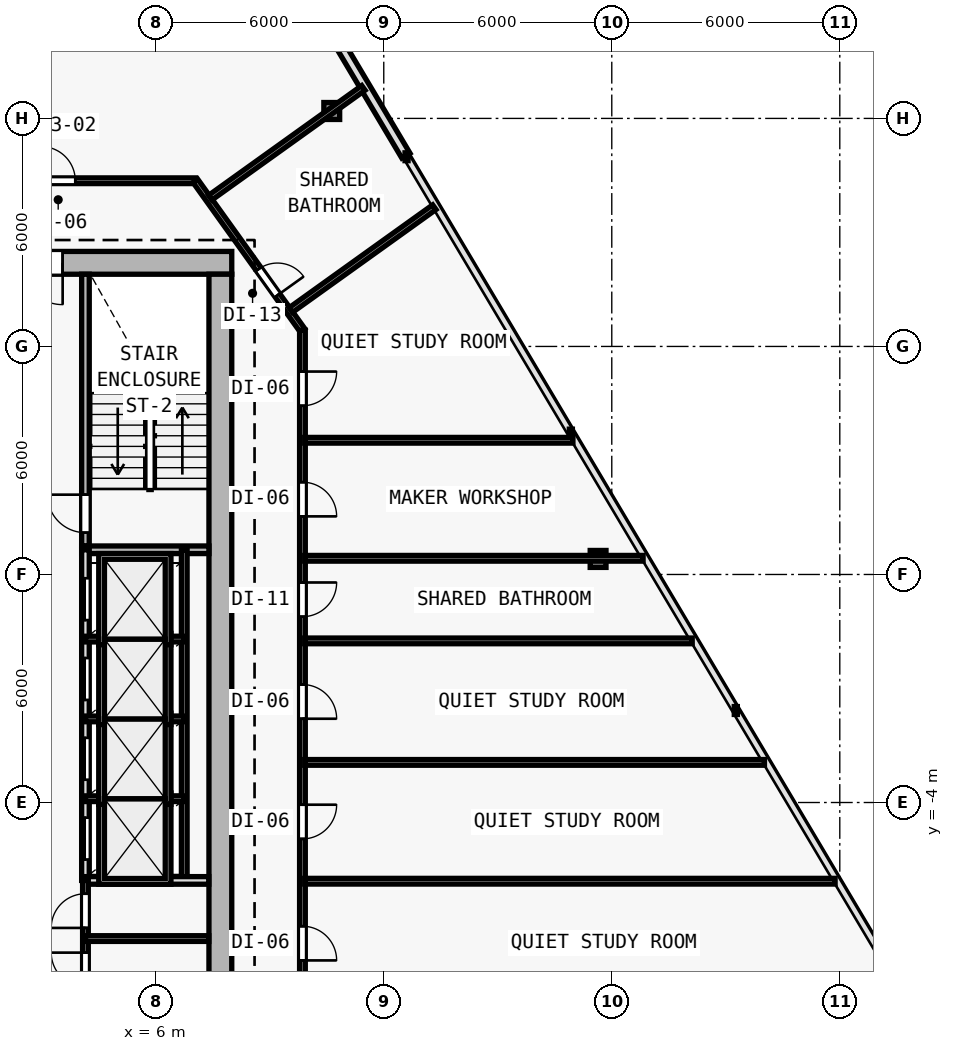
"""IFC4 building model, lengths in metres.
Left out: names, types, materials, properties, quantities, classifications, styles, units other than length and angle.
Written with IfcOpenShell. Run it as: python <this file> out.ifc"""

import sys

from ifc_helpers import new_model, si_unit, direction, frame, frame_2d, origin, origin_2d, place, context, subcontext, project, spatial, rectangle, i_section, extrude, element, fill, save


model = new_model("IFC4")
c1 = context("Model", 3, precision=1e-05, world=origin(), true_north=direction((0.0, 1.0)))
c2 = subcontext(c1, "Body", "Model", "MODEL_VIEW")
j1 = project(units=[si_unit("LENGTHUNIT", "METRE"), si_unit("PLANEANGLEUNIT", "RADIAN")], contexts=[c1])
p1 = place(None, origin())
s1 = spatial("IfcSite", under=j1, at=p1, CompositionType="ELEMENT")
p2 = place(p1, origin())
s2 = spatial("IfcBuilding", under=s1, at=p2, CompositionType="ELEMENT")
p3 = place(p2, frame((0.0, 0.0, 48.0)))
s3 = spatial("IfcBuildingStorey", under=s2, at=p3, CompositionType="ELEMENT", Elevation=48.0)
for number, where, z_axis, x_axis in (
    (1, (7.7, 10.2, 0.0), (0.0, 0.0, 1.0), (1.0, 0.0, 0.0)),
    (2, (7.7, 0.4, 0.0), (0.0, 0.0, 1.0), (1.0, 0.0, 0.0)),
):
    element("IfcColumn", number, at=place(p3, frame(where, z_axis=z_axis, x_axis=x_axis)), inside=s3, PredefinedType="COLUMN", context=c2, shape_type="SweptSolid", body=[
        extrude(i_section(OverallWidth=0.416, OverallDepth=0.446, WebThickness=0.025, FlangeThickness=0.04, FilletRadius=0.015, at=origin_2d()), origin(), (0.0, 0.0, 1.0), 3.6),
    ])
p4 = place(p3, frame((17.64, 2.409, 0.006), z_axis=(-0.018907326549, 0.00952167524, 0.999775900241), x_axis=(-0.449781931574, -0.893138406984, 0.0)))
e3 = element("IfcColumn", 3, at=p4, inside=s3, PredefinedType="COLUMN", context=c2, shape_type="SweptSolid", body=[
    extrude(i_section(OverallWidth=0.416, OverallDepth=0.446, WebThickness=0.025, FlangeThickness=0.04, FilletRadius=0.015, at=origin_2d()), origin(), (0.0, 0.0, 1.0), 3.59),
])
p5 = place(p3, frame((10.632, 14.195, 0.006), z_axis=(-0.011767855299, -0.002516824544, 0.999927588966), x_axis=(0.209143047003, -0.977885057607, 0.0)))
e4 = element("IfcColumn", 4, at=p5, inside=s3, PredefinedType="COLUMN", context=c2, shape_type="SweptSolid", body=[
    extrude(i_section(OverallWidth=0.416, OverallDepth=0.446, WebThickness=0.025, FlangeThickness=0.04, FilletRadius=0.015, at=origin_2d()), origin(), (0.0, 0.0, 1.0), 3.589),
])
p6 = place(p3, frame((6.483, 23.278, 0.0), z_axis=(0.0, 0.0, 1.0), x_axis=(0.511086421046, -0.859529330635, 0.0)))
e5 = element("IfcWall", 5, at=p6, inside=s3, PredefinedType="SOLIDWALL", context=c2, shape_type="SweptSolid", body=[
    extrude(rectangle(XDim=11.935, YDim=0.25, at=frame_2d((5.968, 0.0))), origin(), (0.0, 0.0, 1.0), 3.35),
])
p7 = place(p6, frame((5.368, 0.0, 0.62)))
e6 = element("IfcOpeningElement", 6, at=p7, cuts=e5, PredefinedType="OPENING", context=c2, shape_type="SweptSolid", body=[
    extrude(rectangle(XDim=1.2, YDim=1.8, at=frame_2d((0.6, 0.9))), frame((0.0, 0.135, 0.0), z_axis=(0.0, -1.0, 0.0), x_axis=(1.0, 0.0, 0.0)), (0.0, 0.0, 1.0), 0.27),
])
p8 = place(p3, frame((8.0, 10.2, 0.0), z_axis=(0.0, 0.0, 1.0), x_axis=(-1.0, 0.0, 0.0)))
e7 = element("IfcWall", 7, at=p8, inside=s3, PredefinedType="SHEAR", context=c2, shape_type="SweptSolid", body=[
    extrude(rectangle(XDim=16.0, YDim=0.6, at=frame_2d((8.0, 0.0))), origin(), (0.0, 0.0, 1.0), 3.35),
])
p9 = place(p8, frame((4.45, 0.0, 0.0)))
e8 = element("IfcOpeningElement", 8, at=p9, cuts=e7, PredefinedType="OPENING", context=c2, shape_type="SweptSolid", body=[
    extrude(rectangle(XDim=1.1, YDim=2.15, at=frame_2d((0.55, 1.075))), frame((0.0, 0.31, 0.0), z_axis=(0.0, -1.0, 0.0), x_axis=(1.0, 0.0, 0.0)), (0.0, 0.0, 1.0), 0.62),
])
p10 = place(p3, frame((7.7, 9.9, 0.0), z_axis=(0.0, 0.0, 1.0), x_axis=(0.0, -1.0, 0.0)))
e9 = element("IfcWall", 9, at=p10, inside=s3, PredefinedType="SHEAR", context=c2, shape_type="SweptSolid", body=[
    extrude(rectangle(XDim=19.0, YDim=0.6, at=frame_2d((9.5, 0.0))), origin(), (0.0, 0.0, 1.0), 3.35),
])
p11 = place(p3, frame((4.15, 2.75, 0.0), z_axis=(0.0, 0.0, 1.0), x_axis=(0.0, 1.0, 0.0)))
e10 = element("IfcWall", 10, at=p11, inside=s3, PredefinedType="SOLIDWALL", context=c2, shape_type="SweptSolid", body=[
    extrude(rectangle(XDim=7.15, YDim=0.2, at=frame_2d((3.575, 0.0))), origin(), (0.0, 0.0, 1.0), 3.35),
])
p12 = place(p11, frame((0.35, 0.0, 0.0)))
e11 = element("IfcOpeningElement", 11, at=p12, cuts=e10, PredefinedType="OPENING", context=c2, shape_type="SweptSolid", body=[
    extrude(rectangle(XDim=1.0, YDim=2.15, at=frame_2d((0.5, 1.075))), frame((0.0, 0.11, 0.0), z_axis=(0.0, -1.0, 0.0), x_axis=(1.0, 0.0, 0.0)), (0.0, 0.0, 1.0), 0.22),
])
p13 = place(p3, frame((4.05, 2.65, 0.0), z_axis=(0.0, 0.0, 1.0), x_axis=(1.0, 0.0, 0.0)))
e12 = element("IfcWall", 12, at=p13, inside=s3, PredefinedType="SOLIDWALL", context=c2, shape_type="SweptSolid", body=[
    extrude(rectangle(XDim=3.35, YDim=0.2, at=frame_2d((1.675, 0.0))), origin(), (0.0, 0.0, 1.0), 3.35),
])
p14 = place(p3, frame((4.15, -6.05, 0.0), z_axis=(0.0, 0.0, 1.0), x_axis=(0.0, 1.0, 0.0)))
e13 = element("IfcWall", 13, at=p14, inside=s3, PredefinedType="SOLIDWALL", context=c2, shape_type="SweptSolid", body=[
    extrude(rectangle(XDim=8.7, YDim=0.2, at=frame_2d((4.35, 0.0))), origin(), (0.0, 0.0, 1.0), 3.35),
])
p15 = place(p14, frame((0.55, 0.0, 0.0)))
e14 = element("IfcOpeningElement", 14, at=p15, cuts=e13, PredefinedType="OPENING", context=c2, shape_type="SweptSolid", body=[
    extrude(rectangle(XDim=1.1, YDim=2.15, at=frame_2d((0.55, 1.075))), frame((0.0, 0.11, 0.0), z_axis=(0.0, -1.0, 0.0), x_axis=(1.0, 0.0, 0.0)), (0.0, 0.0, 1.0), 0.22),
])
p16 = place(p14, frame((2.65, 0.0, 0.0)))
e15 = element("IfcOpeningElement", 15, at=p16, cuts=e13, PredefinedType="OPENING", context=c2, shape_type="SweptSolid", body=[
    extrude(rectangle(XDim=1.1, YDim=2.15, at=frame_2d((0.55, 1.075))), frame((0.0, 0.11, 0.0), z_axis=(0.0, -1.0, 0.0), x_axis=(1.0, 0.0, 0.0)), (0.0, 0.0, 1.0), 0.22),
])
p17 = place(p14, frame((4.75, 0.0, 0.0)))
e16 = element("IfcOpeningElement", 16, at=p17, cuts=e13, PredefinedType="OPENING", context=c2, shape_type="SweptSolid", body=[
    extrude(rectangle(XDim=1.1, YDim=2.15, at=frame_2d((0.55, 1.075))), frame((0.0, 0.11, 0.0), z_axis=(0.0, -1.0, 0.0), x_axis=(1.0, 0.0, 0.0)), (0.0, 0.0, 1.0), 0.22),
])
p18 = place(p14, frame((6.85, 0.0, 0.0)))
e17 = element("IfcOpeningElement", 17, at=p18, cuts=e13, PredefinedType="OPENING", context=c2, shape_type="SweptSolid", body=[
    extrude(rectangle(XDim=1.1, YDim=2.15, at=frame_2d((0.55, 1.075))), frame((0.0, 0.11, 0.0), z_axis=(0.0, -1.0, 0.0), x_axis=(1.0, 0.0, 0.0)), (0.0, 0.0, 1.0), 0.22),
])
p19 = place(p3, frame((6.75, -6.05, 0.0), z_axis=(0.0, 0.0, 1.0), x_axis=(0.0, 1.0, 0.0)))
e18 = element("IfcWall", 18, at=p19, inside=s3, PredefinedType="PARTITIONING", context=c2, shape_type="SweptSolid", body=[
    extrude(rectangle(XDim=8.7, YDim=0.15, at=frame_2d((4.35, 0.0))), origin(), (0.0, 0.0, 1.0), 3.35),
])
for number, where, z_axis, x_axis in (
    (19, (4.15, -3.9, 0.0), (0.0, 0.0, 1.0), (1.0, 0.0, 0.0)),
    (20, (4.15, -1.8, 0.0), (0.0, 0.0, 1.0), (1.0, 0.0, 0.0)),
    (21, (4.15, 0.3, 0.0), (0.0, 0.0, 1.0), (1.0, 0.0, 0.0)),
):
    element("IfcWall", number, at=place(p3, frame(where, z_axis=z_axis, x_axis=x_axis)), inside=s3, PredefinedType="PARTITIONING", context=c2, shape_type="SweptSolid", body=[
        extrude(rectangle(XDim=2.6, YDim=0.15, at=frame_2d((1.3, 0.0))), origin(), (0.0, 0.0, 1.0), 3.35),
    ])
p20 = place(p3, frame((4.15, -6.05, 0.0), z_axis=(0.0, 0.0, 1.0), x_axis=(1.0, 0.0, 0.0)))
e22 = element("IfcWall", 22, at=p20, inside=s3, PredefinedType="SOLIDWALL", context=c2, shape_type="SweptSolid", body=[
    extrude(rectangle(XDim=3.245, YDim=0.2, at=frame_2d((1.623, 0.0))), origin(), (0.0, 0.0, 1.0), 3.35),
])
p21 = place(p3, frame((4.15, -9.095, 0.0), z_axis=(0.0, 0.0, 1.0), x_axis=(0.0, 1.0, 0.0)))
e23 = element("IfcWall", 23, at=p21, inside=s3, PredefinedType="PARTITIONING", context=c2, shape_type="SweptSolid", body=[
    extrude(rectangle(XDim=3.045, YDim=0.15, at=frame_2d((1.522, 0.0))), origin(), (0.0, 0.0, 1.0), 3.35),
])
p22 = place(p21, frame((0.245, 0.0, 0.0)))
e24 = element("IfcOpeningElement", 24, at=p22, cuts=e23, PredefinedType="OPENING", context=c2, shape_type="SweptSolid", body=[
    extrude(rectangle(XDim=0.9, YDim=2.1, at=frame_2d((0.45, 1.05))), frame((0.0, 0.085, 0.0), z_axis=(0.0, -1.0, 0.0), x_axis=(1.0, 0.0, 0.0)), (0.0, 0.0, 1.0), 0.17),
])
p23 = place(p21, frame((1.795, 0.0, 0.0)))
e25 = element("IfcOpeningElement", 25, at=p23, cuts=e23, PredefinedType="OPENING", context=c2, shape_type="SweptSolid", body=[
    extrude(rectangle(XDim=0.9, YDim=2.1, at=frame_2d((0.45, 1.05))), frame((0.0, 0.085, 0.0), z_axis=(0.0, -1.0, 0.0), x_axis=(1.0, 0.0, 0.0)), (0.0, 0.0, 1.0), 0.17),
])
p24 = place(p3, frame((4.15, -7.58, 0.0), z_axis=(0.0, 0.0, 1.0), x_axis=(1.0, 0.0, 0.0)))
e26 = element("IfcWall", 26, at=p24, inside=s3, PredefinedType="PARTITIONING", context=c2, shape_type="SweptSolid", body=[
    extrude(rectangle(XDim=3.245, YDim=0.15, at=frame_2d((1.623, 0.0))), origin(), (0.0, 0.0, 1.0), 3.35),
])
p25 = place(p3, frame((-7.041, 12.36, 0.0), z_axis=(0.0, 0.0, 1.0), x_axis=(1.0, 0.0, 0.0)))
e27 = element("IfcWall", 27, at=p25, inside=s3, PredefinedType="PARTITIONING", context=c2, shape_type="SweptSolid", body=[
    extrude(rectangle(XDim=14.082, YDim=0.15, at=frame_2d((7.041, 0.0))), origin(), (0.0, 0.0, 1.0), 3.35),
])
p26 = place(p25, frame((10.024, 0.0, 0.0)))
e28 = element("IfcOpeningElement", 28, at=p26, cuts=e27, PredefinedType="OPENING", context=c2, shape_type="SweptSolid", body=[
    extrude(rectangle(XDim=0.9, YDim=2.1, at=frame_2d((0.45, 1.05))), frame((0.0, 0.085, 0.0), z_axis=(0.0, -1.0, 0.0), x_axis=(1.0, 0.0, 0.0)), (0.0, 0.0, 1.0), 0.17),
])
p27 = place(p25, frame((3.161, 0.0, 0.0)))
e29 = element("IfcOpeningElement", 29, at=p27, cuts=e27, PredefinedType="OPENING", context=c2, shape_type="SweptSolid", body=[
    extrude(rectangle(XDim=0.9, YDim=2.1, at=frame_2d((0.45, 1.05))), frame((0.0, 0.085, 0.0), z_axis=(0.0, -1.0, 0.0), x_axis=(1.0, 0.0, 0.0)), (0.0, 0.0, 1.0), 0.17),
])
p28 = place(p3, frame((7.041, 12.36, 0.0), z_axis=(0.0, 0.0, 1.0), x_axis=(0.582449511476, -0.812866881218, 0.0)))
e30 = element("IfcWall", 30, at=p28, inside=s3, PredefinedType="PARTITIONING", context=c2, shape_type="SweptSolid", body=[
    extrude(rectangle(XDim=4.84, YDim=0.15, at=frame_2d((2.42, 0.0))), origin(), (0.0, 0.0, 1.0), 2.725),
])
p29 = place(p28, frame((2.86, 0.0, 0.0)))
e31 = element("IfcOpeningElement", 31, at=p29, cuts=e30, PredefinedType="OPENING", context=c2, shape_type="SweptSolid", body=[
    extrude(rectangle(XDim=0.85, YDim=2.1, at=frame_2d((0.425, 1.05))), frame((0.0, 0.085, 0.0), z_axis=(0.0, -1.0, 0.0), x_axis=(1.0, 0.0, 0.0)), (0.0, 0.0, 1.0), 0.17),
])
p30 = place(p3, frame((9.86, 8.426, 0.0), z_axis=(0.0, 0.0, 1.0), x_axis=(0.0, -1.0, 0.0)))
e32 = element("IfcWall", 32, at=p30, inside=s3, PredefinedType="PARTITIONING", context=c2, shape_type="SweptSolid", body=[
    extrude(rectangle(XDim=19.986, YDim=0.15, at=frame_2d((9.993, 0.0))), origin(), (0.0, 0.0, 1.0), 2.609),
])
p31 = place(p30, frame((15.681, 0.0, 0.0)))
e33 = element("IfcOpeningElement", 33, at=p31, cuts=e32, PredefinedType="OPENING", context=c2, shape_type="SweptSolid", body=[
    extrude(rectangle(XDim=0.9, YDim=2.1, at=frame_2d((0.45, 1.05))), frame((0.0, 0.085, 0.0), z_axis=(0.0, -1.0, 0.0), x_axis=(1.0, 0.0, 0.0)), (0.0, 0.0, 1.0), 0.17),
])
p32 = place(p30, frame((12.483, 0.0, 0.0)))
e34 = element("IfcOpeningElement", 34, at=p32, cuts=e32, PredefinedType="OPENING", context=c2, shape_type="SweptSolid", body=[
    extrude(rectangle(XDim=0.9, YDim=2.1, at=frame_2d((0.45, 1.05))), frame((0.0, 0.085, 0.0), z_axis=(0.0, -1.0, 0.0), x_axis=(1.0, 0.0, 0.0)), (0.0, 0.0, 1.0), 0.17),
])
p33 = place(p30, frame((9.322, 0.0, 0.0)))
e35 = element("IfcOpeningElement", 35, at=p33, cuts=e32, PredefinedType="OPENING", context=c2, shape_type="SweptSolid", body=[
    extrude(rectangle(XDim=0.9, YDim=2.1, at=frame_2d((0.45, 1.05))), frame((0.0, 0.085, 0.0), z_axis=(0.0, -1.0, 0.0), x_axis=(1.0, 0.0, 0.0)), (0.0, 0.0, 1.0), 0.17),
])
p34 = place(p30, frame((6.636, 0.0, 0.0)))
e36 = element("IfcOpeningElement", 36, at=p34, cuts=e32, PredefinedType="OPENING", context=c2, shape_type="SweptSolid", body=[
    extrude(rectangle(XDim=0.9, YDim=2.1, at=frame_2d((0.45, 1.05))), frame((0.0, 0.085, 0.0), z_axis=(0.0, -1.0, 0.0), x_axis=(1.0, 0.0, 0.0)), (0.0, 0.0, 1.0), 0.17),
])
p35 = place(p30, frame((3.997, 0.0, 0.0)))
e37 = element("IfcOpeningElement", 37, at=p35, cuts=e32, PredefinedType="OPENING", context=c2, shape_type="SweptSolid", body=[
    extrude(rectangle(XDim=0.9, YDim=2.1, at=frame_2d((0.45, 1.05))), frame((0.0, 0.085, 0.0), z_axis=(0.0, -1.0, 0.0), x_axis=(1.0, 0.0, 0.0)), (0.0, 0.0, 1.0), 0.17),
])
p36 = place(p30, frame((1.086, 0.0, 0.0)))
e38 = element("IfcOpeningElement", 38, at=p36, cuts=e32, PredefinedType="OPENING", context=c2, shape_type="SweptSolid", body=[
    extrude(rectangle(XDim=0.9, YDim=2.1, at=frame_2d((0.45, 1.05))), frame((0.0, 0.085, 0.0), z_axis=(0.0, -1.0, 0.0), x_axis=(1.0, 0.0, 0.0)), (0.0, 0.0, 1.0), 0.17),
])
p37 = place(p3, frame((9.92, 2.426, 0.0), z_axis=(0.0, 0.0, 1.0), x_axis=(1.0, 0.0, 0.0)))
e39 = element("IfcWall", 39, at=p37, inside=s3, PredefinedType="PARTITIONING", context=c2, shape_type="SweptSolid", body=[
    extrude(rectangle(XDim=8.904, YDim=0.15, at=frame_2d((4.452, 0.0))), origin(), (0.0, 0.0, 1.0), 2.735),
])
p38 = place(p3, frame((7.434, 11.915, 0.0), z_axis=(0.0, 0.0, 1.0), x_axis=(0.812890943838, 0.582415928205, 0.0)))
e40 = element("IfcWall", 40, at=p38, inside=s3, PredefinedType="PARTITIONING", context=c2, shape_type="SweptSolid", body=[
    extrude(rectangle(XDim=4.958, YDim=0.15, at=frame_2d((2.479, 0.0))), origin(), (0.0, 0.0, 1.0), 2.725),
])
p39 = place(p3, frame((9.92, -2.945, 0.0), z_axis=(0.0, 0.0, 1.0), x_axis=(1.0, 0.0, 0.0)))
e41 = element("IfcWall", 41, at=p39, inside=s3, PredefinedType="PARTITIONING", context=c2, shape_type="SweptSolid", body=[
    extrude(rectangle(XDim=12.098, YDim=0.15, at=frame_2d((6.049, 0.0))), origin(), (0.0, 0.0, 1.0), 2.725),
])
p40 = place(p3, frame((9.553, 8.957, 0.0), z_axis=(0.0, 0.0, 1.0), x_axis=(0.812884279405, 0.58242522979, 0.0)))
e42 = element("IfcWall", 42, at=p40, inside=s3, PredefinedType="PARTITIONING", context=c2, shape_type="SweptSolid", body=[
    extrude(rectangle(XDim=4.647, YDim=0.15, at=frame_2d((2.324, 0.0))), origin(), (0.0, 0.0, 1.0), 2.735),
])
p41 = place(p3, frame((9.92, -6.071, 0.0), z_axis=(0.0, 0.0, 1.0), x_axis=(1.0, 0.0, 0.0)))
e43 = element("IfcWall", 43, at=p41, inside=s3, PredefinedType="PARTITIONING", context=c2, shape_type="SweptSolid", body=[
    extrude(rectangle(XDim=13.957, YDim=0.15, at=frame_2d((6.978, 0.0))), origin(), (0.0, 0.0, 1.0), 2.725),
])
p42 = place(p3, frame((9.92, 0.253, 0.0), z_axis=(0.0, 0.0, 1.0), x_axis=(1.0, 0.0, 0.0)))
e44 = element("IfcWall", 44, at=p42, inside=s3, PredefinedType="PARTITIONING", context=c2, shape_type="SweptSolid", body=[
    extrude(rectangle(XDim=10.197, YDim=0.15, at=frame_2d((5.098, 0.0))), origin(), (0.0, 0.0, 1.0), 2.725),
])
p43 = place(p3, frame((9.92, 5.531, 0.0), z_axis=(0.0, 0.0, 1.0), x_axis=(1.0, 0.0, 0.0)))
e45 = element("IfcWall", 45, at=p43, inside=s3, PredefinedType="PARTITIONING", context=c2, shape_type="SweptSolid", body=[
    extrude(rectangle(XDim=7.058, YDim=0.15, at=frame_2d((3.529, 0.0))), origin(), (0.0, 0.0, 1.0), 2.735),
])
p44 = place(p9, origin())
e46 = element("IfcDoor", 46, at=p44, inside=s3, OperationType="SINGLE_SWING_LEFT", PredefinedType="DOOR", context=c2, shape_type="SweptSolid", body=[
    extrude(rectangle(XDim=1.1, YDim=2.15, at=frame_2d((0.55, 1.075))), frame((0.0, 0.025, 0.0), z_axis=(0.0, -1.0, 0.0), x_axis=(1.0, 0.0, 0.0)), (0.0, 0.0, 1.0), 0.05),
])
fill(e8, e46)
p45 = place(p12, origin())
e47 = element("IfcDoor", 47, at=p45, inside=s3, OperationType="SINGLE_SWING_RIGHT", PredefinedType="DOOR", context=c2, shape_type="SweptSolid", body=[
    extrude(rectangle(XDim=1.0, YDim=2.15, at=frame_2d((0.5, 1.075))), frame((0.0, 0.025, 0.0), z_axis=(0.0, -1.0, 0.0), x_axis=(1.0, 0.0, 0.0)), (0.0, 0.0, 1.0), 0.05),
])
fill(e11, e47)
p46 = place(p15, origin())
e48 = element("IfcDoor", 48, at=p46, inside=s3, OperationType="DOUBLE_DOOR_SLIDING", PredefinedType="DOOR", context=c2, shape_type="SweptSolid", body=[
    extrude(rectangle(XDim=1.1, YDim=2.15, at=frame_2d((0.55, 1.075))), frame((0.0, 0.025, 0.0), z_axis=(0.0, -1.0, 0.0), x_axis=(1.0, 0.0, 0.0)), (0.0, 0.0, 1.0), 0.05),
])
fill(e14, e48)
p47 = place(p16, origin())
e49 = element("IfcDoor", 49, at=p47, inside=s3, OperationType="DOUBLE_DOOR_SLIDING", PredefinedType="DOOR", context=c2, shape_type="SweptSolid", body=[
    extrude(rectangle(XDim=1.1, YDim=2.15, at=frame_2d((0.55, 1.075))), frame((0.0, 0.025, 0.0), z_axis=(0.0, -1.0, 0.0), x_axis=(1.0, 0.0, 0.0)), (0.0, 0.0, 1.0), 0.05),
])
fill(e15, e49)
p48 = place(p17, origin())
e50 = element("IfcDoor", 50, at=p48, inside=s3, OperationType="DOUBLE_DOOR_SLIDING", PredefinedType="DOOR", context=c2, shape_type="SweptSolid", body=[
    extrude(rectangle(XDim=1.1, YDim=2.15, at=frame_2d((0.55, 1.075))), frame((0.0, 0.025, 0.0), z_axis=(0.0, -1.0, 0.0), x_axis=(1.0, 0.0, 0.0)), (0.0, 0.0, 1.0), 0.05),
])
fill(e16, e50)
p49 = place(p18, origin())
e51 = element("IfcDoor", 51, at=p49, inside=s3, OperationType="DOUBLE_DOOR_SLIDING", PredefinedType="DOOR", context=c2, shape_type="SweptSolid", body=[
    extrude(rectangle(XDim=1.1, YDim=2.15, at=frame_2d((0.55, 1.075))), frame((0.0, 0.025, 0.0), z_axis=(0.0, -1.0, 0.0), x_axis=(1.0, 0.0, 0.0)), (0.0, 0.0, 1.0), 0.05),
])
fill(e17, e51)
p50 = place(p22, origin())
e52 = element("IfcDoor", 52, at=p50, inside=s3, OperationType="SINGLE_SWING_RIGHT", PredefinedType="DOOR", context=c2, shape_type="SweptSolid", body=[
    extrude(rectangle(XDim=0.9, YDim=2.1, at=frame_2d((0.45, 1.05))), frame((0.0, 0.025, 0.0), z_axis=(0.0, -1.0, 0.0), x_axis=(1.0, 0.0, 0.0)), (0.0, 0.0, 1.0), 0.05),
])
fill(e24, e52)
p51 = place(p23, origin())
e53 = element("IfcDoor", 53, at=p51, inside=s3, OperationType="SINGLE_SWING_LEFT", PredefinedType="DOOR", context=c2, shape_type="SweptSolid", body=[
    extrude(rectangle(XDim=0.9, YDim=2.1, at=frame_2d((0.45, 1.05))), frame((0.0, 0.025, 0.0), z_axis=(0.0, -1.0, 0.0), x_axis=(1.0, 0.0, 0.0)), (0.0, 0.0, 1.0), 0.05),
])
fill(e25, e53)
p52 = place(p31, origin())
e54 = element("IfcDoor", 54, at=p52, inside=s3, OperationType="SINGLE_SWING_RIGHT", PredefinedType="DOOR", context=c2, shape_type="SweptSolid", body=[
    extrude(rectangle(XDim=0.9, YDim=2.1, at=frame_2d((0.45, 1.05))), frame((0.0, 0.025, 0.0), z_axis=(0.0, -1.0, 0.0), x_axis=(1.0, 0.0, 0.0)), (0.0, 0.0, 1.0), 0.05),
])
fill(e33, e54)
p53 = place(p32, origin())
e55 = element("IfcDoor", 55, at=p53, inside=s3, OperationType="SINGLE_SWING_LEFT", PredefinedType="DOOR", context=c2, shape_type="SweptSolid", body=[
    extrude(rectangle(XDim=0.9, YDim=2.1, at=frame_2d((0.45, 1.05))), frame((0.0, 0.025, 0.0), z_axis=(0.0, -1.0, 0.0), x_axis=(1.0, 0.0, 0.0)), (0.0, 0.0, 1.0), 0.05),
])
fill(e34, e55)
p54 = place(p33, origin())
e56 = element("IfcDoor", 56, at=p54, inside=s3, OperationType="SINGLE_SWING_RIGHT", PredefinedType="DOOR", context=c2, shape_type="SweptSolid", body=[
    extrude(rectangle(XDim=0.9, YDim=2.1, at=frame_2d((0.45, 1.05))), frame((0.0, 0.025, 0.0), z_axis=(0.0, -1.0, 0.0), x_axis=(1.0, 0.0, 0.0)), (0.0, 0.0, 1.0), 0.05),
])
fill(e35, e56)
p55 = place(p34, origin())
e57 = element("IfcDoor", 57, at=p55, inside=s3, OperationType="SINGLE_SWING_LEFT", PredefinedType="DOOR", context=c2, shape_type="SweptSolid", body=[
    extrude(rectangle(XDim=0.9, YDim=2.1, at=frame_2d((0.45, 1.05))), frame((0.0, 0.025, 0.0), z_axis=(0.0, -1.0, 0.0), x_axis=(1.0, 0.0, 0.0)), (0.0, 0.0, 1.0), 0.05),
])
fill(e36, e57)
p56 = place(p35, origin())
e58 = element("IfcDoor", 58, at=p56, inside=s3, OperationType="SINGLE_SWING_RIGHT", PredefinedType="DOOR", context=c2, shape_type="SweptSolid", body=[
    extrude(rectangle(XDim=0.9, YDim=2.1, at=frame_2d((0.45, 1.05))), frame((0.0, 0.025, 0.0), z_axis=(0.0, -1.0, 0.0), x_axis=(1.0, 0.0, 0.0)), (0.0, 0.0, 1.0), 0.05),
])
fill(e37, e58)
p57 = place(p36, origin())
e59 = element("IfcDoor", 59, at=p57, inside=s3, OperationType="SINGLE_SWING_LEFT", PredefinedType="DOOR", context=c2, shape_type="SweptSolid", body=[
    extrude(rectangle(XDim=0.9, YDim=2.1, at=frame_2d((0.45, 1.05))), frame((0.0, 0.025, 0.0), z_axis=(0.0, -1.0, 0.0), x_axis=(1.0, 0.0, 0.0)), (0.0, 0.0, 1.0), 0.05),
])
fill(e38, e59)
p58 = place(p29, origin())
e60 = element("IfcDoor", 60, at=p58, inside=s3, OperationType="SINGLE_SWING_RIGHT", PredefinedType="DOOR", context=c2, shape_type="SweptSolid", body=[
    extrude(rectangle(XDim=0.85, YDim=2.1, at=frame_2d((0.425, 1.05))), frame((0.0, 0.025, 0.0), z_axis=(0.0, -1.0, 0.0), x_axis=(1.0, 0.0, 0.0)), (0.0, 0.0, 1.0), 0.05),
])
fill(e31, e60)
p59 = place(p26, origin())
e61 = element("IfcDoor", 61, at=p59, inside=s3, OperationType="SINGLE_SWING_LEFT", PredefinedType="DOOR", context=c2, shape_type="SweptSolid", body=[
    extrude(rectangle(XDim=0.9, YDim=2.1, at=frame_2d((0.45, 1.05))), frame((0.0, 0.025, 0.0), z_axis=(0.0, -1.0, 0.0), x_axis=(1.0, 0.0, 0.0)), (0.0, 0.0, 1.0), 0.05),
])
fill(e28, e61)
save(model, sys.argv[1])
